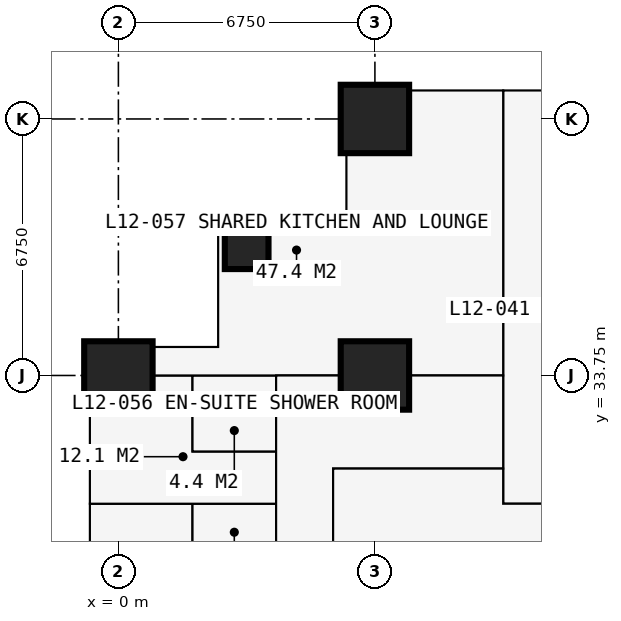
"""IFC4 building model, lengths in metres.
Left out: names, types, materials, properties, quantities, classifications, styles, units other than length and angle.
Written with IfcOpenShell. Run it as: python <this file> out.ifc"""

import sys

from ifc_helpers import new_model, si_unit, direction, frame, frame_2d, origin, origin_2d, place, context, subcontext, project, spatial, rectangle, extrude, element, fill, save


model = new_model("IFC4")
c1 = context("Model", 3, precision=1e-05, world=origin(), true_north=direction((0.0, 1.0)))
c2 = subcontext(c1, "Body", "Model", "MODEL_VIEW")
j1 = project(units=[si_unit("LENGTHUNIT", "METRE"), si_unit("PLANEANGLEUNIT", "RADIAN")], contexts=[c1])
p1 = place(None, origin())
s1 = spatial("IfcSite", under=j1, at=p1, CompositionType="ELEMENT")
p2 = place(p1, origin())
s2 = spatial("IfcBuilding", under=s1, at=p2, CompositionType="ELEMENT")
p3 = place(p2, frame((0.0, 0.0, 46.8)))
s3 = spatial("IfcBuildingStorey", under=s2, at=p3, CompositionType="ELEMENT", Elevation=46.8)
p4 = place(p3, frame((0.0, 33.75, 0.0), z_axis=(0.0, 0.0, 1.0), x_axis=(1.0, 0.0, 0.0)))
e1 = element("IfcColumn", 1, at=p4, inside=s3, PredefinedType="COLUMN", context=c2, shape_type="SweptSolid", body=[
    extrude(rectangle(XDim=1.8, YDim=1.8, at=origin_2d()), origin(), (0.0, 0.0, 1.0), 3.6),
])
p5 = place(p3, frame((3.375, 37.125, 0.0), z_axis=(0.0, 0.0, 1.0), x_axis=(1.0, 0.0, 0.0)))
e2 = element("IfcColumn", 2, at=p5, inside=s3, PredefinedType="COLUMN", context=c2, shape_type="SweptSolid", body=[
    extrude(rectangle(XDim=1.15, YDim=1.15, at=origin_2d()), origin(), (0.0, 0.0, 1.0), 3.6),
])
for number, where, z_axis, x_axis in (
    (3, (6.75, 33.75, 0.0), (0.0, 0.0, 1.0), (1.0, 0.0, 0.0)),
    (4, (6.75, 40.5, 0.0), (0.0, 0.0, 1.0), (1.0, 0.0, 0.0)),
):
    element("IfcColumn", number, at=place(p3, frame(where, z_axis=z_axis, x_axis=x_axis)), inside=s3, PredefinedType="COLUMN", context=c2, shape_type="SweptSolid", body=[
        extrude(rectangle(XDim=1.8, YDim=1.8, at=origin_2d()), origin(), (0.0, 0.0, 1.0), 3.6),
    ])
p6 = place(p3, frame((6.0, 41.25, 0.0), z_axis=(0.0, 0.0, 1.0), x_axis=(0.0, -1.0, 0.0)))
e5 = element("IfcWall", 5, at=p6, inside=s3, PredefinedType="SOLIDWALL", context=c2, shape_type="SweptSolid", body=[
    extrude(rectangle(XDim=3.375, YDim=0.3, at=frame_2d((1.688, 0.0))), origin(), (0.0, 0.0, 1.0), 3.375),
])
p7 = place(p6, frame((1.833, 0.0, 0.9)))
e6 = element("IfcOpeningElement", 6, at=p7, cuts=e5, PredefinedType="OPENING", context=c2, shape_type="SweptSolid", body=[
    extrude(rectangle(XDim=1.2, YDim=1.8, at=frame_2d((0.6, 0.9))), frame((0.0, 0.16, 0.0), z_axis=(0.0, -1.0, 0.0), x_axis=(1.0, 0.0, 0.0)), (0.0, 0.0, 1.0), 0.32),
])
p8 = place(p3, frame((6.0, 37.875, 0.0), z_axis=(0.0, 0.0, 1.0), x_axis=(-1.0, 0.0, 0.0)))
e7 = element("IfcWall", 7, at=p8, inside=s3, PredefinedType="SOLIDWALL", context=c2, shape_type="SweptSolid", body=[
    extrude(rectangle(XDim=3.375, YDim=0.3, at=frame_2d((1.688, 0.0))), origin(), (0.0, 0.0, 1.0), 3.375),
])
p9 = place(p8, frame((0.788, 0.0, 0.6)))
e8 = element("IfcOpeningElement", 8, at=p9, cuts=e7, PredefinedType="OPENING", context=c2, shape_type="SweptSolid", body=[
    extrude(rectangle(XDim=1.8, YDim=2.1, at=frame_2d((0.9, 1.05))), frame((0.0, 0.16, 0.0), z_axis=(0.0, -1.0, 0.0), x_axis=(1.0, 0.0, 0.0)), (0.0, 0.0, 1.0), 0.32),
])
p10 = place(p3, frame((2.625, 37.875, 0.0), z_axis=(0.0, 0.0, 1.0), x_axis=(0.0, -1.0, 0.0)))
e9 = element("IfcWall", 9, at=p10, inside=s3, PredefinedType="SOLIDWALL", context=c2, shape_type="SweptSolid", body=[
    extrude(rectangle(XDim=3.375, YDim=0.3, at=frame_2d((1.688, 0.0))), origin(), (0.0, 0.0, 1.0), 3.375),
])
p11 = place(p10, frame((0.788, 0.0, 0.6)))
e10 = element("IfcOpeningElement", 10, at=p11, cuts=e9, PredefinedType="OPENING", context=c2, shape_type="SweptSolid", body=[
    extrude(rectangle(XDim=1.8, YDim=2.1, at=frame_2d((0.9, 1.05))), frame((0.0, 0.16, 0.0), z_axis=(0.0, -1.0, 0.0), x_axis=(1.0, 0.0, 0.0)), (0.0, 0.0, 1.0), 0.32),
])
p12 = place(p3, frame((2.625, 34.5, 0.0), z_axis=(0.0, 0.0, 1.0), x_axis=(-1.0, 0.0, 0.0)))
e11 = element("IfcWall", 11, at=p12, inside=s3, PredefinedType="SOLIDWALL", context=c2, shape_type="SweptSolid", body=[
    extrude(rectangle(XDim=3.375, YDim=0.3, at=frame_2d((1.688, 0.0))), origin(), (0.0, 0.0, 1.0), 3.375),
])
p13 = place(p12, frame((0.343, 0.0, 0.9)))
e12 = element("IfcOpeningElement", 12, at=p13, cuts=e11, PredefinedType="OPENING", context=c2, shape_type="SweptSolid", body=[
    extrude(rectangle(XDim=1.2, YDim=1.8, at=frame_2d((0.6, 0.9))), frame((0.0, 0.16, 0.0), z_axis=(0.0, -1.0, 0.0), x_axis=(1.0, 0.0, 0.0)), (0.0, 0.0, 1.0), 0.32),
])
p14 = place(p3, frame((-0.734, 30.375, 0.0), z_axis=(0.0, 0.0, 1.0), x_axis=(1.0, 0.0, 0.0)))
e13 = element("IfcWall", 13, at=p14, inside=s3, PredefinedType="PARTITIONING", context=c2, shape_type="SweptSolid", body=[
    extrude(rectangle(XDim=4.884, YDim=0.175, at=frame_2d((2.442, 0.0))), origin(), (0.0, 0.0, 1.0), 3.375),
])
p15 = place(p3, frame((-0.734, 33.75, 0.0), z_axis=(0.0, 0.0, 1.0), x_axis=(1.0, 0.0, 0.0)))
e14 = element("IfcWall", 14, at=p15, inside=s3, PredefinedType="PARTITIONING", context=c2, shape_type="SweptSolid", body=[
    extrude(rectangle(XDim=10.859, YDim=0.15, at=frame_2d((5.429, 0.0))), origin(), (0.0, 0.0, 1.0), 2.877),
])
p16 = place(p15, frame((8.434, 0.0, 0.0)))
e15 = element("IfcOpeningElement", 15, at=p16, cuts=e14, PredefinedType="OPENING", context=c2, shape_type="SweptSolid", body=[
    extrude(rectangle(XDim=1.0, YDim=2.2, at=frame_2d((0.5, 1.1))), frame((0.0, 0.085, 0.0), z_axis=(0.0, -1.0, 0.0), x_axis=(1.0, 0.0, 0.0)), (0.0, 0.0, 1.0), 0.17),
])
for number, where, z_axis, x_axis in (
    (16, (1.95, 28.375, 0.0), (0.0, 0.0, 1.0), (0.0, 1.0, 0.0)),
    (17, (1.95, 31.75, 0.0), (0.0, 0.0, 1.0), (0.0, 1.0, 0.0)),
):
    element("IfcWall", number, at=place(p3, frame(where, z_axis=z_axis, x_axis=x_axis)), inside=s3, PredefinedType="PARTITIONING", context=c2, shape_type="SweptSolid", body=[
        extrude(rectangle(XDim=2.0, YDim=0.1, at=frame_2d((1.0, 0.0))), origin(), (0.0, 0.0, 1.0), 3.375),
    ])
p17 = place(p3, frame((1.95, 31.75, 0.0), z_axis=(0.0, 0.0, 1.0), x_axis=(1.0, 0.0, 0.0)))
e18 = element("IfcWall", 18, at=p17, inside=s3, PredefinedType="PARTITIONING", context=c2, shape_type="SweptSolid", body=[
    extrude(rectangle(XDim=2.2, YDim=0.1, at=frame_2d((1.1, 0.0))), origin(), (0.0, 0.0, 1.0), 3.375),
])
p18 = place(p17, frame((0.65, 0.0, 0.0)))
e19 = element("IfcOpeningElement", 19, at=p18, cuts=e18, PredefinedType="OPENING", context=c2, shape_type="SweptSolid", body=[
    extrude(rectangle(XDim=0.9, YDim=2.2, at=frame_2d((0.45, 1.1))), frame((0.0, 0.06, 0.0), z_axis=(0.0, -1.0, 0.0), x_axis=(1.0, 0.0, 0.0)), (0.0, 0.0, 1.0), 0.12),
])
p19 = place(p3, frame((4.15, 10.125, 0.0), z_axis=(0.0, 0.0, 1.0), x_axis=(0.0, 1.0, 0.0)))
e20 = element("IfcWall", 20, at=p19, inside=s3, PredefinedType="PARTITIONING", context=c2, shape_type="SweptSolid", body=[
    extrude(rectangle(XDim=23.625, YDim=0.1, at=frame_2d((11.812, 0.0))), origin(), (0.0, 0.0, 1.0), 3.375),
])
p20 = place(p19, frame((0.2, 0.0, 0.0)))
e21 = element("IfcOpeningElement", 21, at=p20, cuts=e20, PredefinedType="OPENING", context=c2, shape_type="SweptSolid", body=[
    extrude(rectangle(XDim=0.95, YDim=2.2, at=frame_2d((0.475, 1.1))), frame((0.0, 0.06, 0.0), z_axis=(0.0, -1.0, 0.0), x_axis=(1.0, 0.0, 0.0)), (0.0, 0.0, 1.0), 0.12),
])
p21 = place(p19, frame((3.625, 0.0, 0.0)))
e22 = element("IfcOpeningElement", 22, at=p21, cuts=e20, PredefinedType="OPENING", context=c2, shape_type="SweptSolid", body=[
    extrude(rectangle(XDim=0.95, YDim=2.2, at=frame_2d((0.475, 1.1))), frame((0.0, 0.06, 0.0), z_axis=(0.0, -1.0, 0.0), x_axis=(1.0, 0.0, 0.0)), (0.0, 0.0, 1.0), 0.12),
])
p22 = place(p19, frame((7.0, 0.0, 0.0)))
e23 = element("IfcOpeningElement", 23, at=p22, cuts=e20, PredefinedType="OPENING", context=c2, shape_type="SweptSolid", body=[
    extrude(rectangle(XDim=0.95, YDim=2.2, at=frame_2d((0.475, 1.1))), frame((0.0, 0.06, 0.0), z_axis=(0.0, -1.0, 0.0), x_axis=(1.0, 0.0, 0.0)), (0.0, 0.0, 1.0), 0.12),
])
p23 = place(p19, frame((10.375, 0.0, 0.0)))
e24 = element("IfcOpeningElement", 24, at=p23, cuts=e20, PredefinedType="OPENING", context=c2, shape_type="SweptSolid", body=[
    extrude(rectangle(XDim=0.95, YDim=2.2, at=frame_2d((0.475, 1.1))), frame((0.0, 0.06, 0.0), z_axis=(0.0, -1.0, 0.0), x_axis=(1.0, 0.0, 0.0)), (0.0, 0.0, 1.0), 0.12),
])
p24 = place(p19, frame((13.75, 0.0, 0.0)))
e25 = element("IfcOpeningElement", 25, at=p24, cuts=e20, PredefinedType="OPENING", context=c2, shape_type="SweptSolid", body=[
    extrude(rectangle(XDim=0.95, YDim=2.2, at=frame_2d((0.475, 1.1))), frame((0.0, 0.06, 0.0), z_axis=(0.0, -1.0, 0.0), x_axis=(1.0, 0.0, 0.0)), (0.0, 0.0, 1.0), 0.12),
])
p25 = place(p19, frame((17.125, 0.0, 0.0)))
e26 = element("IfcOpeningElement", 26, at=p25, cuts=e20, PredefinedType="OPENING", context=c2, shape_type="SweptSolid", body=[
    extrude(rectangle(XDim=0.95, YDim=2.2, at=frame_2d((0.475, 1.1))), frame((0.0, 0.06, 0.0), z_axis=(0.0, -1.0, 0.0), x_axis=(1.0, 0.0, 0.0)), (0.0, 0.0, 1.0), 0.12),
])
p26 = place(p19, frame((20.5, 0.0, 0.0)))
e27 = element("IfcOpeningElement", 27, at=p26, cuts=e20, PredefinedType="OPENING", context=c2, shape_type="SweptSolid", body=[
    extrude(rectangle(XDim=0.95, YDim=2.2, at=frame_2d((0.475, 1.1))), frame((0.0, 0.06, 0.0), z_axis=(0.0, -1.0, 0.0), x_axis=(1.0, 0.0, 0.0)), (0.0, 0.0, 1.0), 0.12),
])
p27 = place(p3, frame((5.65, 22.988, 0.0), z_axis=(0.0, 0.0, 1.0), x_axis=(0.0, 1.0, 0.0)))
e28 = element("IfcWall", 28, at=p27, inside=s3, PredefinedType="PARTITIONING", context=c2, shape_type="SweptSolid", body=[
    extrude(rectangle(XDim=8.312, YDim=0.15, at=frame_2d((4.156, 0.0))), origin(), (0.0, 0.0, 1.0), 3.375),
])
p28 = place(p27, frame((4.95, 0.0, 0.0)))
e29 = element("IfcOpeningElement", 29, at=p28, cuts=e28, PredefinedType="OPENING", context=c2, shape_type="SweptSolid", body=[
    extrude(rectangle(XDim=0.95, YDim=2.2, at=frame_2d((0.475, 1.1))), frame((0.0, 0.085, 0.0), z_axis=(0.0, -1.0, 0.0), x_axis=(1.0, 0.0, 0.0)), (0.0, 0.0, 1.0), 0.17),
])
p29 = place(p3, frame((5.65, 31.3, 0.0), z_axis=(0.0, 0.0, 1.0), x_axis=(1.0, 0.0, 0.0)))
e30 = element("IfcWall", 30, at=p29, inside=s3, PredefinedType="PARTITIONING", context=c2, shape_type="SweptSolid", body=[
    extrude(rectangle(XDim=4.475, YDim=0.15, at=frame_2d((2.238, 0.0))), origin(), (0.0, 0.0, 1.0), 3.375),
])
p30 = place(p3, frame((10.125, 30.375, 0.0), z_axis=(0.0, 0.0, 1.0), x_axis=(0.0, 1.0, 0.0)))
e31 = element("IfcWall", 31, at=p30, inside=s3, PredefinedType="PARTITIONING", context=c2, shape_type="SweptSolid", body=[
    extrude(rectangle(XDim=10.859, YDim=0.15, at=frame_2d((5.429, 0.0))), origin(), (0.0, 0.0, 1.0), 3.375),
])
p31 = place(p3, frame((10.125, 30.375, 0.0), z_axis=(0.0, 0.0, 1.0), x_axis=(1.0, 0.0, 0.0)))
e32 = element("IfcWall", 32, at=p31, inside=s3, PredefinedType="PARTITIONING", context=c2, shape_type="SweptSolid", body=[
    extrude(rectangle(XDim=1.175, YDim=0.15, at=frame_2d((0.587, 0.0))), origin(), (0.0, 0.0, 1.0), 3.375),
])
p32 = place(p7, origin())
e33 = element("IfcWindow", 33, at=p32, inside=s3, PartitioningType="SINGLE_PANEL", PredefinedType="WINDOW", context=c2, shape_type="SweptSolid", body=[
    extrude(rectangle(XDim=1.2, YDim=1.8, at=frame_2d((0.6, 0.9))), frame((0.0, 0.03, 0.0), z_axis=(0.0, -1.0, 0.0), x_axis=(1.0, 0.0, 0.0)), (0.0, 0.0, 1.0), 0.06),
])
fill(e6, e33)
p33 = place(p9, origin())
e34 = element("IfcWindow", 34, at=p33, inside=s3, PartitioningType="SINGLE_PANEL", PredefinedType="WINDOW", context=c2, shape_type="SweptSolid", body=[
    extrude(rectangle(XDim=1.8, YDim=2.1, at=frame_2d((0.9, 1.05))), frame((0.0, 0.03, 0.0), z_axis=(0.0, -1.0, 0.0), x_axis=(1.0, 0.0, 0.0)), (0.0, 0.0, 1.0), 0.06),
])
fill(e8, e34)
p34 = place(p11, origin())
e35 = element("IfcWindow", 35, at=p34, inside=s3, PartitioningType="SINGLE_PANEL", PredefinedType="WINDOW", context=c2, shape_type="SweptSolid", body=[
    extrude(rectangle(XDim=1.8, YDim=2.1, at=frame_2d((0.9, 1.05))), frame((0.0, 0.03, 0.0), z_axis=(0.0, -1.0, 0.0), x_axis=(1.0, 0.0, 0.0)), (0.0, 0.0, 1.0), 0.06),
])
fill(e10, e35)
p35 = place(p13, origin())
e36 = element("IfcWindow", 36, at=p35, inside=s3, PartitioningType="SINGLE_PANEL", PredefinedType="WINDOW", context=c2, shape_type="SweptSolid", body=[
    extrude(rectangle(XDim=1.2, YDim=1.8, at=frame_2d((0.6, 0.9))), frame((0.0, 0.03, 0.0), z_axis=(0.0, -1.0, 0.0), x_axis=(1.0, 0.0, 0.0)), (0.0, 0.0, 1.0), 0.06),
])
fill(e12, e36)
p36 = place(p26, origin())
e37 = element("IfcDoor", 37, at=p36, inside=s3, OperationType="SINGLE_SWING_LEFT", PredefinedType="DOOR", context=c2, shape_type="SweptSolid", body=[
    extrude(rectangle(XDim=0.95, YDim=2.2, at=frame_2d((0.475, 1.1))), frame((0.0, 0.025, 0.0), z_axis=(0.0, -1.0, 0.0), x_axis=(1.0, 0.0, 0.0)), (0.0, 0.0, 1.0), 0.05),
])
fill(e27, e37)
p37 = place(p18, origin())
e38 = element("IfcDoor", 38, at=p37, inside=s3, OperationType="SINGLE_SWING_RIGHT", PredefinedType="DOOR", context=c2, shape_type="SweptSolid", body=[
    extrude(rectangle(XDim=0.9, YDim=2.2, at=frame_2d((0.45, 1.1))), frame((0.0, 0.025, 0.0), z_axis=(0.0, -1.0, 0.0), x_axis=(1.0, 0.0, 0.0)), (0.0, 0.0, 1.0), 0.05),
])
fill(e19, e38)
p38 = place(p16, origin())
e39 = element("IfcDoor", 39, at=p38, inside=s3, OperationType="SINGLE_SWING_LEFT", PredefinedType="DOOR", context=c2, shape_type="SweptSolid", body=[
    extrude(rectangle(XDim=1.0, YDim=2.2, at=frame_2d((0.5, 1.1))), frame((0.0, 0.025, 0.0), z_axis=(0.0, -1.0, 0.0), x_axis=(1.0, 0.0, 0.0)), (0.0, 0.0, 1.0), 0.05),
])
fill(e15, e39)
save(model, sys.argv[1])
